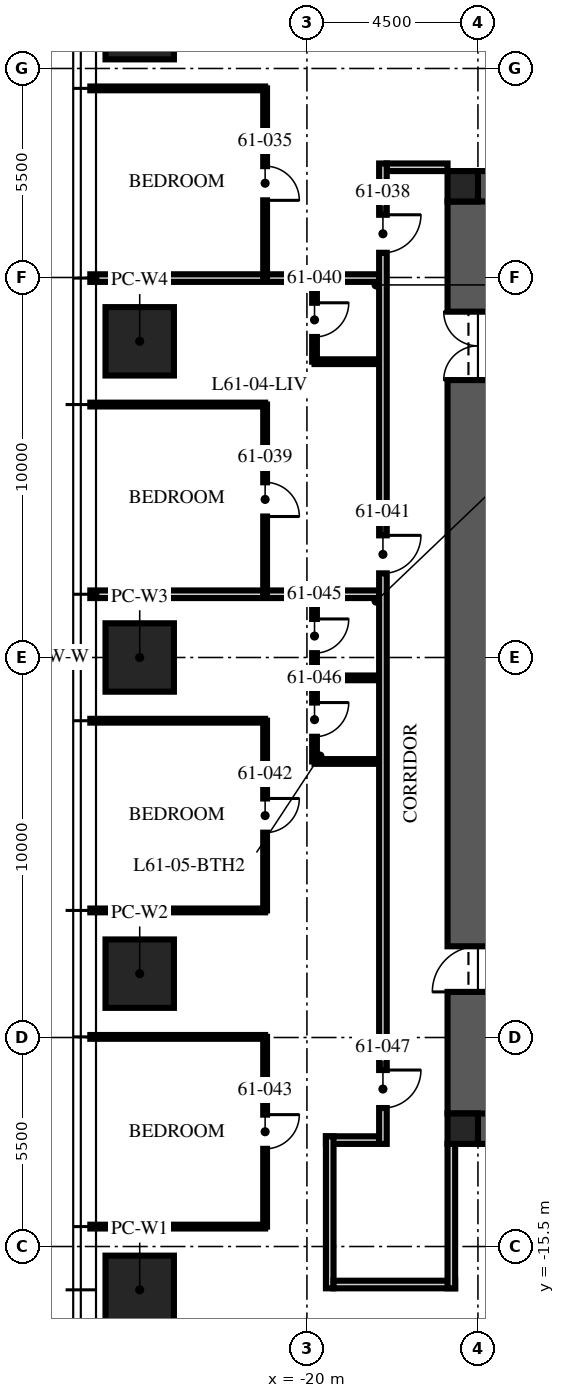
"""IFC4 building model, lengths in metres.
Left out: names, types, materials, properties, quantities, classifications, styles, units other than length and angle.
Written with IfcOpenShell. Run it as: python <this file> out.ifc"""

import sys

from ifc_helpers import new_model, si_unit, direction, frame, frame_2d, origin, origin_2d, place, context, subcontext, project, spatial, rectangle, extrude, element, fill, save


model = new_model("IFC4")
c1 = context("Model", 3, precision=1e-05, world=origin(), true_north=direction((0.0, 1.0)))
c2 = subcontext(c1, "Body", "Model", "MODEL_VIEW")
j1 = project(units=[si_unit("LENGTHUNIT", "METRE"), si_unit("PLANEANGLEUNIT", "RADIAN")], contexts=[c1])
p1 = place(None, origin())
s1 = spatial("IfcSite", under=j1, at=p1, CompositionType="ELEMENT")
p2 = place(p1, origin())
s2 = spatial("IfcBuilding", under=s1, at=p2, CompositionType="ELEMENT")
p3 = place(p2, frame((0.0, 0.0, 244.5)))
s3 = spatial("IfcBuildingStorey", under=s2, at=p3, CompositionType="ELEMENT", Elevation=244.5)
for number, where, z_axis, x_axis in (
    (1, (-15.5, 12.0, -0.25), (0.0, 0.0, 1.0), (1.0, 0.0, 0.0)),
    (2, (-15.5, -12.0, -0.25), (0.0, 0.0, 1.0), (1.0, 0.0, 0.0)),
):
    element("IfcWall", number, at=place(p3, frame(where, z_axis=z_axis, x_axis=x_axis)), inside=s3, PredefinedType="SHEAR", context=c2, shape_type="SweptSolid", body=[
        extrude(rectangle(XDim=31.0, YDim=1.6, at=frame_2d((15.5, 0.0))), origin(), (0.0, 0.0, 1.0), 3.75),
    ])
p4 = place(p3, frame((-15.5, -12.0, -0.25), z_axis=(0.0, 0.0, 1.0), x_axis=(0.0, 1.0, 0.0)))
e3 = element("IfcWall", 3, at=p4, inside=s3, PredefinedType="SHEAR", context=c2, shape_type="SweptSolid", body=[
    extrude(rectangle(XDim=24.0, YDim=1.6, at=frame_2d((12.0, 0.0))), origin(), (0.0, 0.0, 1.0), 3.75),
])
p5 = place(p4, frame((3.2, 0.0, 0.25)))
e4 = element("IfcOpeningElement", 4, at=p5, cuts=e3, PredefinedType="OPENING", context=c2, shape_type="SweptSolid", body=[
    extrude(rectangle(XDim=1.2, YDim=2.1, at=frame_2d((0.6, 1.05))), frame((0.0, 0.81, 0.0), z_axis=(0.0, -1.0, 0.0), x_axis=(1.0, 0.0, 0.0)), (0.0, 0.0, 1.0), 1.62),
])
p6 = place(p4, frame((19.3, 0.0, 0.25)))
e5 = element("IfcOpeningElement", 5, at=p6, cuts=e3, PredefinedType="OPENING", context=c2, shape_type="SweptSolid", body=[
    extrude(rectangle(XDim=1.8, YDim=2.1, at=frame_2d((0.9, 1.05))), frame((0.0, 0.81, 0.0), z_axis=(0.0, -1.0, 0.0), x_axis=(1.0, 0.0, 0.0)), (0.0, 0.0, 1.0), 1.62),
])
for number, where, z_axis, x_axis in (
    (6, (-15.9, 12.4, -0.25), (0.0, 0.0, 1.0), (1.0, 0.0, 0.0)),
    (7, (-15.9, -12.4, -0.25), (0.0, 0.0, 1.0), (1.0, 0.0, 0.0)),
):
    element("IfcColumn", number, at=place(p3, frame(where, z_axis=z_axis, x_axis=x_axis)), inside=s3, PredefinedType="COLUMN", context=c2, shape_type="SweptSolid", body=[
        extrude(rectangle(XDim=0.8, YDim=0.8, at=origin_2d()), origin(), (0.0, 0.0, 1.0), 3.75),
    ])
for number, where, z_axis, x_axis in (
    (8, (-24.4, -16.64, 0.0), (0.0, 0.0, 1.0), (0.0, 1.0, 0.0)),
    (9, (-24.4, -8.32, 0.0), (0.0, 0.0, 1.0), (0.0, 1.0, 0.0)),
    (10, (-24.4, 0.0, 0.0), (0.0, 0.0, 1.0), (0.0, 1.0, 0.0)),
    (11, (-24.4, 8.32, 0.0), (0.0, 0.0, 1.0), (0.0, 1.0, 0.0)),
    (12, (-24.4, 16.64, 0.0), (0.0, 0.0, 1.0), (0.0, 1.0, 0.0)),
):
    element("IfcColumn", number, at=place(p3, frame(where, z_axis=z_axis, x_axis=x_axis)), inside=s3, PredefinedType="COLUMN", context=c2, shape_type="SweptSolid", body=[
        extrude(rectangle(XDim=1.8, YDim=1.8, at=origin_2d()), origin(), (0.0, 0.0, 1.0), 3.75),
    ])
p7 = place(p3, frame((-18.1, -12.7, 0.0), z_axis=(0.0, 0.0, 1.0), x_axis=(-1.0, 0.0, 0.0)))
e13 = element("IfcWall", 13, at=p7, inside=s3, PredefinedType="PARTITIONING", context=c2, shape_type="SweptSolid", body=[
    extrude(rectangle(XDim=1.4, YDim=0.2, at=frame_2d((0.7, 0.0))), origin(), (0.0, 0.0, 1.0), 2.81),
])
p8 = place(p3, frame((-19.4, -12.6, 0.0), z_axis=(0.0, 0.0, 1.0), x_axis=(0.0, -1.0, 0.0)))
e14 = element("IfcWall", 14, at=p8, inside=s3, PredefinedType="PARTITIONING", context=c2, shape_type="SweptSolid", body=[
    extrude(rectangle(XDim=4.0, YDim=0.2, at=frame_2d((2.0, 0.0))), origin(), (0.0, 0.0, 1.0), 2.6),
])
p9 = place(p3, frame((-19.3, -16.5, 0.0), z_axis=(0.0, 0.0, 1.0), x_axis=(1.0, 0.0, 0.0)))
e15 = element("IfcWall", 15, at=p9, inside=s3, PredefinedType="PARTITIONING", context=c2, shape_type="SweptSolid", body=[
    extrude(rectangle(XDim=3.2, YDim=0.2, at=frame_2d((1.6, 0.0))), origin(), (0.0, 0.0, 1.0), 2.3),
])
p10 = place(p3, frame((-16.2, -16.6, 0.0), z_axis=(0.0, 0.0, 1.0), x_axis=(0.0, 1.0, 0.0)))
e16 = element("IfcWall", 16, at=p10, inside=s3, PredefinedType="PARTITIONING", context=c2, shape_type="SweptSolid", body=[
    extrude(rectangle(XDim=3.8, YDim=0.2, at=frame_2d((1.9, 0.0))), origin(), (0.0, 0.0, 1.0), 2.3),
])
p11 = place(p3, frame((-16.3, 12.9, 0.0), z_axis=(0.0, 0.0, 1.0), x_axis=(-1.0, 0.0, 0.0)))
e17 = element("IfcWall", 17, at=p11, inside=s3, PredefinedType="PARTITIONING", context=c2, shape_type="SweptSolid", body=[
    extrude(rectangle(XDim=1.6, YDim=0.2, at=frame_2d((0.8, 0.0))), origin(), (0.0, 0.0, 1.0), 2.3),
])
p12 = place(p3, frame((-21.1, 14.976, 0.0), z_axis=(0.0, 0.0, 1.0), x_axis=(-1.0, 0.0, 0.0)))
e18 = element("IfcWall", 18, at=p12, inside=s3, PredefinedType="PARTITIONING", context=c2, shape_type="SweptSolid", body=[
    extrude(rectangle(XDim=4.6, YDim=0.1, at=frame_2d((2.3, 0.0))), origin(), (0.0, 0.0, 1.0), 2.91),
])
p13 = place(p3, frame((-18.1, 9.984, 0.0), z_axis=(0.0, 0.0, 1.0), x_axis=(-1.0, 0.0, 0.0)))
e19 = element("IfcWall", 19, at=p13, inside=s3, PredefinedType="PARTITIONING", context=c2, shape_type="SweptSolid", body=[
    extrude(rectangle(XDim=7.6, YDim=0.2, at=frame_2d((3.8, 0.0))), origin(), (0.0, 0.0, 1.0), 2.91),
])
p14 = place(p3, frame((-21.1, 6.656, 0.0), z_axis=(0.0, 0.0, 1.0), x_axis=(-1.0, 0.0, 0.0)))
e20 = element("IfcWall", 20, at=p14, inside=s3, PredefinedType="PARTITIONING", context=c2, shape_type="SweptSolid", body=[
    extrude(rectangle(XDim=4.6, YDim=0.1, at=frame_2d((2.3, 0.0))), origin(), (0.0, 0.0, 1.0), 2.91),
])
p15 = place(p3, frame((-18.1, 1.664, 0.0), z_axis=(0.0, 0.0, 1.0), x_axis=(-1.0, 0.0, 0.0)))
e21 = element("IfcWall", 21, at=p15, inside=s3, PredefinedType="PARTITIONING", context=c2, shape_type="SweptSolid", body=[
    extrude(rectangle(XDim=7.6, YDim=0.2, at=frame_2d((3.8, 0.0))), origin(), (0.0, 0.0, 1.0), 2.91),
])
for number, where, z_axis, x_axis in (
    (22, (-21.1, -1.664, 0.0), (0.0, 0.0, 1.0), (-1.0, 0.0, 0.0)),
    (23, (-21.1, -6.656, 0.0), (0.0, 0.0, 1.0), (-1.0, 0.0, 0.0)),
    (24, (-21.1, -9.984, 0.0), (0.0, 0.0, 1.0), (-1.0, 0.0, 0.0)),
    (25, (-21.1, -14.976, 0.0), (0.0, 0.0, 1.0), (-1.0, 0.0, 0.0)),
):
    element("IfcWall", number, at=place(p3, frame(where, z_axis=z_axis, x_axis=x_axis)), inside=s3, PredefinedType="PARTITIONING", context=c2, shape_type="SweptSolid", body=[
        extrude(rectangle(XDim=4.6, YDim=0.1, at=frame_2d((2.3, 0.0))), origin(), (0.0, 0.0, 1.0), 2.91),
    ])
p16 = place(p3, frame((-21.1, 14.976, 0.0), z_axis=(0.0, 0.0, 1.0), x_axis=(0.0, -1.0, 0.0)))
e26 = element("IfcWall", 26, at=p16, inside=s3, PredefinedType="PARTITIONING", context=c2, shape_type="SweptSolid", body=[
    extrude(rectangle(XDim=4.992, YDim=0.1, at=frame_2d((2.496, 0.0))), origin(), (0.0, 0.0, 1.0), 2.81),
])
p17 = place(p16, frame((2.046, 0.0, 0.0)))
e27 = element("IfcOpeningElement", 27, at=p17, cuts=e26, PredefinedType="OPENING", context=c2, shape_type="SweptSolid", body=[
    extrude(rectangle(XDim=0.9, YDim=2.1, at=frame_2d((0.45, 1.05))), frame((0.0, 0.06, 0.0), z_axis=(0.0, -1.0, 0.0), x_axis=(1.0, 0.0, 0.0)), (0.0, 0.0, 1.0), 0.12),
])
p18 = place(p3, frame((-21.1, 6.656, 0.0), z_axis=(0.0, 0.0, 1.0), x_axis=(0.0, -1.0, 0.0)))
e28 = element("IfcWall", 28, at=p18, inside=s3, PredefinedType="PARTITIONING", context=c2, shape_type="SweptSolid", body=[
    extrude(rectangle(XDim=4.992, YDim=0.1, at=frame_2d((2.496, 0.0))), origin(), (0.0, 0.0, 1.0), 2.81),
])
p19 = place(p18, frame((2.046, 0.0, 0.0)))
e29 = element("IfcOpeningElement", 29, at=p19, cuts=e28, PredefinedType="OPENING", context=c2, shape_type="SweptSolid", body=[
    extrude(rectangle(XDim=0.9, YDim=2.1, at=frame_2d((0.45, 1.05))), frame((0.0, 0.06, 0.0), z_axis=(0.0, -1.0, 0.0), x_axis=(1.0, 0.0, 0.0)), (0.0, 0.0, 1.0), 0.12),
])
p20 = place(p3, frame((-19.8, 9.984, 0.0), z_axis=(0.0, 0.0, 1.0), x_axis=(0.0, -1.0, 0.0)))
e30 = element("IfcWall", 30, at=p20, inside=s3, PredefinedType="PARTITIONING", context=c2, shape_type="SweptSolid", body=[
    extrude(rectangle(XDim=2.2, YDim=0.125, at=frame_2d((1.1, 0.0))), origin(), (0.0, 0.0, 1.0), 2.6),
])
p21 = place(p20, frame((0.65, 0.0, 0.0)))
e31 = element("IfcOpeningElement", 31, at=p21, cuts=e30, PredefinedType="OPENING", context=c2, shape_type="SweptSolid", body=[
    extrude(rectangle(XDim=0.9, YDim=2.1, at=frame_2d((0.45, 1.05))), frame((0.0, 0.073, 0.0), z_axis=(0.0, -1.0, 0.0), x_axis=(1.0, 0.0, 0.0)), (0.0, 0.0, 1.0), 0.145),
])
p22 = place(p3, frame((-18.1, 7.784, 0.0), z_axis=(0.0, 0.0, 1.0), x_axis=(-1.0, 0.0, 0.0)))
e32 = element("IfcWall", 32, at=p22, inside=s3, PredefinedType="PARTITIONING", context=c2, shape_type="SweptSolid", body=[
    extrude(rectangle(XDim=1.7, YDim=0.125, at=frame_2d((0.85, 0.0))), origin(), (0.0, 0.0, 1.0), 3.5),
])
p23 = place(p3, frame((-21.1, -1.664, 0.0), z_axis=(0.0, 0.0, 1.0), x_axis=(0.0, -1.0, 0.0)))
e33 = element("IfcWall", 33, at=p23, inside=s3, PredefinedType="PARTITIONING", context=c2, shape_type="SweptSolid", body=[
    extrude(rectangle(XDim=4.992, YDim=0.1, at=frame_2d((2.496, 0.0))), origin(), (0.0, 0.0, 1.0), 2.81),
])
p24 = place(p23, frame((2.046, 0.0, 0.0)))
e34 = element("IfcOpeningElement", 34, at=p24, cuts=e33, PredefinedType="OPENING", context=c2, shape_type="SweptSolid", body=[
    extrude(rectangle(XDim=0.9, YDim=2.1, at=frame_2d((0.45, 1.05))), frame((0.0, 0.06, 0.0), z_axis=(0.0, -1.0, 0.0), x_axis=(1.0, 0.0, 0.0)), (0.0, 0.0, 1.0), 0.12),
])
p25 = place(p3, frame((-21.1, -9.984, 0.0), z_axis=(0.0, 0.0, 1.0), x_axis=(0.0, -1.0, 0.0)))
e35 = element("IfcWall", 35, at=p25, inside=s3, PredefinedType="PARTITIONING", context=c2, shape_type="SweptSolid", body=[
    extrude(rectangle(XDim=4.992, YDim=0.1, at=frame_2d((2.496, 0.0))), origin(), (0.0, 0.0, 1.0), 2.81),
])
p26 = place(p25, frame((2.046, 0.0, 0.0)))
e36 = element("IfcOpeningElement", 36, at=p26, cuts=e35, PredefinedType="OPENING", context=c2, shape_type="SweptSolid", body=[
    extrude(rectangle(XDim=0.9, YDim=2.1, at=frame_2d((0.45, 1.05))), frame((0.0, 0.06, 0.0), z_axis=(0.0, -1.0, 0.0), x_axis=(1.0, 0.0, 0.0)), (0.0, 0.0, 1.0), 0.12),
])
p27 = place(p3, frame((-19.8, 1.664, 0.0), z_axis=(0.0, 0.0, 1.0), x_axis=(0.0, -1.0, 0.0)))
e37 = element("IfcWall", 37, at=p27, inside=s3, PredefinedType="PARTITIONING", context=c2, shape_type="SweptSolid", body=[
    extrude(rectangle(XDim=4.4, YDim=0.125, at=frame_2d((2.2, 0.0))), origin(), (0.0, 0.0, 1.0), 2.6),
])
p28 = place(p27, frame((0.65, 0.0, 0.0)))
e38 = element("IfcOpeningElement", 38, at=p28, cuts=e37, PredefinedType="OPENING", context=c2, shape_type="SweptSolid", body=[
    extrude(rectangle(XDim=0.9, YDim=2.1, at=frame_2d((0.45, 1.05))), frame((0.0, 0.073, 0.0), z_axis=(0.0, -1.0, 0.0), x_axis=(1.0, 0.0, 0.0)), (0.0, 0.0, 1.0), 0.145),
])
p29 = place(p27, frame((2.85, 0.0, 0.0)))
e39 = element("IfcOpeningElement", 39, at=p29, cuts=e37, PredefinedType="OPENING", context=c2, shape_type="SweptSolid", body=[
    extrude(rectangle(XDim=0.9, YDim=2.1, at=frame_2d((0.45, 1.05))), frame((0.0, 0.073, 0.0), z_axis=(0.0, -1.0, 0.0), x_axis=(1.0, 0.0, 0.0)), (0.0, 0.0, 1.0), 0.145),
])
for number, where, z_axis, x_axis in (
    (40, (-18.1, -0.536, 0.0), (0.0, 0.0, 1.0), (-1.0, 0.0, 0.0)),
    (41, (-18.1, -2.736, 0.0), (0.0, 0.0, 1.0), (-1.0, 0.0, 0.0)),
):
    element("IfcWall", number, at=place(p3, frame(where, z_axis=z_axis, x_axis=x_axis)), inside=s3, PredefinedType="PARTITIONING", context=c2, shape_type="SweptSolid", body=[
        extrude(rectangle(XDim=1.7, YDim=0.125, at=frame_2d((0.85, 0.0))), origin(), (0.0, 0.0, 1.0), 3.5),
    ])
p30 = place(p3, frame((-18.0, 13.0, 0.0), z_axis=(0.0, 0.0, 1.0), x_axis=(0.0, -1.0, 0.0)))
e42 = element("IfcWall", 42, at=p30, inside=s3, PredefinedType="PARTITIONING", context=c2, shape_type="SweptSolid", body=[
    extrude(rectangle(XDim=25.8, YDim=0.2, at=frame_2d((12.9, 0.0))), origin(), (0.0, 0.0, 1.0), 2.6),
])
p31 = place(p30, frame((1.35, 0.0, 0.0)))
e43 = element("IfcOpeningElement", 43, at=p31, cuts=e42, PredefinedType="OPENING", context=c2, shape_type="SweptSolid", body=[
    extrude(rectangle(XDim=1.0, YDim=2.2, at=frame_2d((0.5, 1.1))), frame((0.0, 0.11, 0.0), z_axis=(0.0, -1.0, 0.0), x_axis=(1.0, 0.0, 0.0)), (0.0, 0.0, 1.0), 0.22),
])
p32 = place(p30, frame((9.786, 0.0, 0.0)))
e44 = element("IfcOpeningElement", 44, at=p32, cuts=e42, PredefinedType="OPENING", context=c2, shape_type="SweptSolid", body=[
    extrude(rectangle(XDim=1.0, YDim=2.2, at=frame_2d((0.5, 1.1))), frame((0.0, 0.11, 0.0), z_axis=(0.0, -1.0, 0.0), x_axis=(1.0, 0.0, 0.0)), (0.0, 0.0, 1.0), 0.22),
])
p33 = place(p30, frame((23.856, 0.0, 0.0)))
e45 = element("IfcOpeningElement", 45, at=p33, cuts=e42, PredefinedType="OPENING", context=c2, shape_type="SweptSolid", body=[
    extrude(rectangle(XDim=1.0, YDim=2.2, at=frame_2d((0.5, 1.1))), frame((0.0, 0.11, 0.0), z_axis=(0.0, -1.0, 0.0), x_axis=(1.0, 0.0, 0.0)), (0.0, 0.0, 1.0), 0.22),
])
p34 = place(p5, origin())
e46 = element("IfcDoor", 46, at=p34, inside=s3, OperationType="SINGLE_SWING_LEFT", PredefinedType="DOOR", context=c2, shape_type="SweptSolid", body=[
    extrude(rectangle(XDim=1.2, YDim=2.1, at=frame_2d((0.6, 1.05))), frame((0.0, 0.025, 0.0), z_axis=(0.0, -1.0, 0.0), x_axis=(1.0, 0.0, 0.0)), (0.0, 0.0, 1.0), 0.05),
])
fill(e4, e46)
p35 = place(p6, origin())
e47 = element("IfcDoor", 47, at=p35, inside=s3, OperationType="DOUBLE_DOOR_SINGLE_SWING", PredefinedType="DOOR", context=c2, shape_type="SweptSolid", body=[
    extrude(rectangle(XDim=1.8, YDim=2.1, at=frame_2d((0.9, 1.05))), frame((0.0, 0.025, 0.0), z_axis=(0.0, -1.0, 0.0), x_axis=(1.0, 0.0, 0.0)), (0.0, 0.0, 1.0), 0.05),
])
fill(e5, e47)
p36 = place(p17, origin())
e48 = element("IfcDoor", 48, at=p36, inside=s3, OperationType="SINGLE_SWING_RIGHT", PredefinedType="DOOR", context=c2, shape_type="SweptSolid", body=[
    extrude(rectangle(XDim=0.9, YDim=2.1, at=frame_2d((0.45, 1.05))), frame((0.0, 0.025, 0.0), z_axis=(0.0, -1.0, 0.0), x_axis=(1.0, 0.0, 0.0)), (0.0, 0.0, 1.0), 0.05),
])
fill(e27, e48)
p37 = place(p31, origin())
e49 = element("IfcDoor", 49, at=p37, inside=s3, OperationType="SINGLE_SWING_LEFT", PredefinedType="DOOR", context=c2, shape_type="SweptSolid", body=[
    extrude(rectangle(XDim=1.0, YDim=2.2, at=frame_2d((0.5, 1.1))), frame((0.0, 0.025, 0.0), z_axis=(0.0, -1.0, 0.0), x_axis=(1.0, 0.0, 0.0)), (0.0, 0.0, 1.0), 0.05),
])
fill(e43, e49)
p38 = place(p19, origin())
e50 = element("IfcDoor", 50, at=p38, inside=s3, OperationType="SINGLE_SWING_RIGHT", PredefinedType="DOOR", context=c2, shape_type="SweptSolid", body=[
    extrude(rectangle(XDim=0.9, YDim=2.1, at=frame_2d((0.45, 1.05))), frame((0.0, 0.025, 0.0), z_axis=(0.0, -1.0, 0.0), x_axis=(1.0, 0.0, 0.0)), (0.0, 0.0, 1.0), 0.05),
])
fill(e29, e50)
p39 = place(p21, origin())
e51 = element("IfcDoor", 51, at=p39, inside=s3, OperationType="SINGLE_SWING_LEFT", PredefinedType="DOOR", context=c2, shape_type="SweptSolid", body=[
    extrude(rectangle(XDim=0.9, YDim=2.1, at=frame_2d((0.45, 1.05))), frame((0.0, 0.025, 0.0), z_axis=(0.0, -1.0, 0.0), x_axis=(1.0, 0.0, 0.0)), (0.0, 0.0, 1.0), 0.05),
])
fill(e31, e51)
p40 = place(p32, origin())
e52 = element("IfcDoor", 52, at=p40, inside=s3, OperationType="SINGLE_SWING_LEFT", PredefinedType="DOOR", context=c2, shape_type="SweptSolid", body=[
    extrude(rectangle(XDim=1.0, YDim=2.2, at=frame_2d((0.5, 1.1))), frame((0.0, 0.025, 0.0), z_axis=(0.0, -1.0, 0.0), x_axis=(1.0, 0.0, 0.0)), (0.0, 0.0, 1.0), 0.05),
])
fill(e44, e52)
p41 = place(p24, origin())
e53 = element("IfcDoor", 53, at=p41, inside=s3, OperationType="SINGLE_SWING_LEFT", PredefinedType="DOOR", context=c2, shape_type="SweptSolid", body=[
    extrude(rectangle(XDim=0.9, YDim=2.1, at=frame_2d((0.45, 1.05))), frame((0.0, 0.025, 0.0), z_axis=(0.0, -1.0, 0.0), x_axis=(1.0, 0.0, 0.0)), (0.0, 0.0, 1.0), 0.05),
])
fill(e34, e53)
p42 = place(p26, origin())
e54 = element("IfcDoor", 54, at=p42, inside=s3, OperationType="SINGLE_SWING_LEFT", PredefinedType="DOOR", context=c2, shape_type="SweptSolid", body=[
    extrude(rectangle(XDim=0.9, YDim=2.1, at=frame_2d((0.45, 1.05))), frame((0.0, 0.025, 0.0), z_axis=(0.0, -1.0, 0.0), x_axis=(1.0, 0.0, 0.0)), (0.0, 0.0, 1.0), 0.05),
])
fill(e36, e54)
p43 = place(p28, origin())
e55 = element("IfcDoor", 55, at=p43, inside=s3, OperationType="SINGLE_SWING_LEFT", PredefinedType="DOOR", context=c2, shape_type="SweptSolid", body=[
    extrude(rectangle(XDim=0.9, YDim=2.1, at=frame_2d((0.45, 1.05))), frame((0.0, 0.025, 0.0), z_axis=(0.0, -1.0, 0.0), x_axis=(1.0, 0.0, 0.0)), (0.0, 0.0, 1.0), 0.05),
])
fill(e38, e55)
p44 = place(p29, origin())
e56 = element("IfcDoor", 56, at=p44, inside=s3, OperationType="SINGLE_SWING_LEFT", PredefinedType="DOOR", context=c2, shape_type="SweptSolid", body=[
    extrude(rectangle(XDim=0.9, YDim=2.1, at=frame_2d((0.45, 1.05))), frame((0.0, 0.025, 0.0), z_axis=(0.0, -1.0, 0.0), x_axis=(1.0, 0.0, 0.0)), (0.0, 0.0, 1.0), 0.05),
])
fill(e39, e56)
p45 = place(p33, origin())
e57 = element("IfcDoor", 57, at=p45, inside=s3, OperationType="SINGLE_SWING_LEFT", PredefinedType="DOOR", context=c2, shape_type="SweptSolid", body=[
    extrude(rectangle(XDim=1.0, YDim=2.2, at=frame_2d((0.5, 1.1))), frame((0.0, 0.025, 0.0), z_axis=(0.0, -1.0, 0.0), x_axis=(1.0, 0.0, 0.0)), (0.0, 0.0, 1.0), 0.05),
])
fill(e45, e57)
save(model, sys.argv[1])
